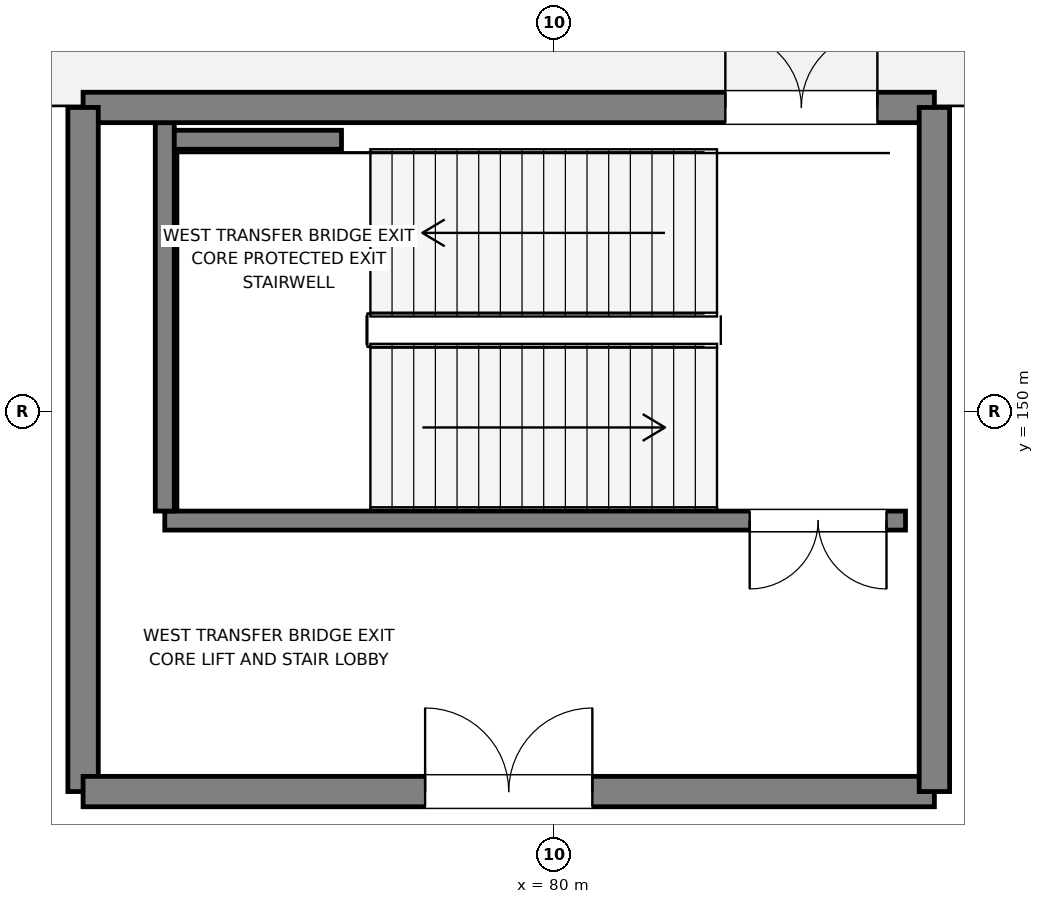
"""IFC4 building model, lengths in metres.
Left out: names, types, materials, properties, quantities, classifications, styles, units other than length and angle.
Written with IfcOpenShell. Run it as: python <this file> out.ifc"""

import sys

from ifc_helpers import new_model, si_unit, direction, frame, frame_2d, origin, place, context, subcontext, project, spatial, rectangle, extrude, element, fill, save


model = new_model("IFC4")
c1 = context("Model", 3, precision=1e-05, world=origin(), true_north=direction((0.0, 1.0)))
c2 = subcontext(c1, "Body", "Model", "MODEL_VIEW")
j1 = project(units=[si_unit("LENGTHUNIT", "METRE"), si_unit("PLANEANGLEUNIT", "RADIAN")], contexts=[c1])
p1 = place(None, origin())
s1 = spatial("IfcSite", under=j1, at=p1, CompositionType="ELEMENT")
p2 = place(p1, origin())
s2 = spatial("IfcBuilding", under=s1, at=p2, CompositionType="ELEMENT")
p3 = place(p2, origin())
s3 = spatial("IfcBuildingStorey", under=s2, at=p3, CompositionType="ELEMENT", Elevation=0.0)
p4 = place(p3, frame((84.62, 148.565, 0.0), z_axis=(0.0, 0.0, 1.0), x_axis=(-1.0, 0.0, 0.0)))
e1 = element("IfcWall", 1, at=p4, inside=s3, PredefinedType="SOLIDWALL", context=c2, shape_type="SweptSolid", body=[
    extrude(rectangle(XDim=9.745, YDim=0.25, at=frame_2d((4.872, 0.0))), origin(), (0.0, 0.0, 1.0), 5.62),
])
p5 = place(p4, frame((0.25, 0.0, 0.0)))
e2 = element("IfcOpeningElement", 2, at=p5, cuts=e1, PredefinedType="OPENING", context=c2, shape_type="SweptSolid", body=[
    extrude(rectangle(XDim=1.8, YDim=2.25, at=frame_2d((0.9, 1.125))), frame((0.0, 0.135, 0.0), z_axis=(0.0, -1.0, 0.0), x_axis=(1.0, 0.0, 0.0)), (0.0, 0.0, 1.0), 0.27),
])
p6 = place(p3, frame((74.875, 153.8, 0.0), z_axis=(0.0, 0.0, 1.0), x_axis=(0.0, -1.0, 0.0)))
e3 = element("IfcWall", 3, at=p6, inside=s3, PredefinedType="SOLIDWALL", context=c2, shape_type="SweptSolid", body=[
    extrude(rectangle(XDim=5.11, YDim=0.25, at=frame_2d((2.555, 0.0))), origin(), (0.0, 0.0, 1.0), 5.62),
])
p7 = place(p3, frame((77.2, 153.575, 0.0), z_axis=(0.0, 0.0, 1.0), x_axis=(-1.0, 0.0, 0.0)))
e4 = element("IfcWall", 4, at=p7, inside=s3, PredefinedType="SOLIDWALL", context=c2, shape_type="SweptSolid", body=[
    extrude(rectangle(XDim=2.2, YDim=0.25, at=frame_2d((1.1, 0.0))), origin(), (0.0, 0.0, 1.0), 5.62),
])
p8 = place(p3, frame((85.0, 154.0, 0.0), z_axis=(0.0, 0.0, 1.0), x_axis=(-1.0, 0.0, 0.0)))
e5 = element("IfcWall", 5, at=p8, inside=s3, PredefinedType="SHEAR", context=c2, shape_type="SweptSolid", body=[
    extrude(rectangle(XDim=11.2, YDim=0.4, at=frame_2d((5.6, 0.0))), origin(), (0.0, 0.0, 1.0), 5.64),
])
p9 = place(p8, frame((0.75, 0.0, 0.0)))
e6 = element("IfcOpeningElement", 6, at=p9, cuts=e5, PredefinedType="OPENING", context=c2, shape_type="SweptSolid", body=[
    extrude(rectangle(XDim=2.0, YDim=2.4, at=frame_2d((1.0, 1.2))), frame((0.0, 0.21, 0.0), z_axis=(0.0, -1.0, 0.0), x_axis=(1.0, 0.0, 0.0)), (0.0, 0.0, 1.0), 0.42),
])
p10 = place(p3, frame((73.8, 154.0, 0.0), z_axis=(0.0, 0.0, 1.0), x_axis=(0.0, -1.0, 0.0)))
e7 = element("IfcWall", 7, at=p10, inside=s3, PredefinedType="SHEAR", context=c2, shape_type="SweptSolid", body=[
    extrude(rectangle(XDim=9.0, YDim=0.4, at=frame_2d((4.5, 0.0))), origin(), (0.0, 0.0, 1.0), 5.64),
])
p11 = place(p3, frame((73.8, 145.0, 0.0), z_axis=(0.0, 0.0, 1.0), x_axis=(1.0, 0.0, 0.0)))
e8 = element("IfcWall", 8, at=p11, inside=s3, PredefinedType="SHEAR", context=c2, shape_type="SweptSolid", body=[
    extrude(rectangle(XDim=11.2, YDim=0.4, at=frame_2d((5.6, 0.0))), origin(), (0.0, 0.0, 1.0), 5.64),
])
p12 = place(p11, frame((4.5, 0.0, 0.0)))
e9 = element("IfcOpeningElement", 9, at=p12, cuts=e8, PredefinedType="OPENING", context=c2, shape_type="SweptSolid", body=[
    extrude(rectangle(XDim=2.2, YDim=2.3, at=frame_2d((1.1, 1.15))), frame((0.0, 0.21, 0.0), z_axis=(0.0, -1.0, 0.0), x_axis=(1.0, 0.0, 0.0)), (0.0, 0.0, 1.0), 0.42),
])
p13 = place(p3, frame((85.0, 145.0, 0.0), z_axis=(0.0, 0.0, 1.0), x_axis=(0.0, 1.0, 0.0)))
e10 = element("IfcWall", 10, at=p13, inside=s3, PredefinedType="SHEAR", context=c2, shape_type="SweptSolid", body=[
    extrude(rectangle(XDim=9.0, YDim=0.4, at=frame_2d((4.5, 0.0))), origin(), (0.0, 0.0, 1.0), 5.64),
])
p14 = place(p5, origin())
e11 = element("IfcDoor", 11, at=p14, inside=s3, OperationType="DOUBLE_DOOR_SINGLE_SWING", PredefinedType="DOOR", context=c2, shape_type="SweptSolid", body=[
    extrude(rectangle(XDim=1.8, YDim=2.25, at=frame_2d((0.9, 1.125))), frame((0.0, 0.025, 0.0), z_axis=(0.0, -1.0, 0.0), x_axis=(1.0, 0.0, 0.0)), (0.0, 0.0, 1.0), 0.05),
])
fill(e2, e11)
p15 = place(p9, frame((2.0, 0.0, 0.0), z_axis=(0.0, 0.0, 1.0), x_axis=(-1.0, 0.0, 0.0)))
e12 = element("IfcDoor", 12, at=p15, inside=s3, OperationType="DOUBLE_DOOR_SINGLE_SWING", PredefinedType="DOOR", context=c2, shape_type="SweptSolid", body=[
    extrude(rectangle(XDim=2.0, YDim=2.4, at=frame_2d((1.0, 1.2))), frame((0.0, 0.025, 0.0), z_axis=(0.0, -1.0, 0.0), x_axis=(1.0, 0.0, 0.0)), (0.0, 0.0, 1.0), 0.05),
])
fill(e6, e12)
p16 = place(p12, origin())
e13 = element("IfcDoor", 13, at=p16, inside=s3, OperationType="DOUBLE_DOOR_SINGLE_SWING", PredefinedType="DOOR", context=c2, shape_type="SweptSolid", body=[
    extrude(rectangle(XDim=2.2, YDim=2.3, at=frame_2d((1.1, 1.15))), frame((0.0, 0.025, 0.0), z_axis=(0.0, -1.0, 0.0), x_axis=(1.0, 0.0, 0.0)), (0.0, 0.0, 1.0), 0.05),
])
fill(e9, e13)
save(model, sys.argv[1])
